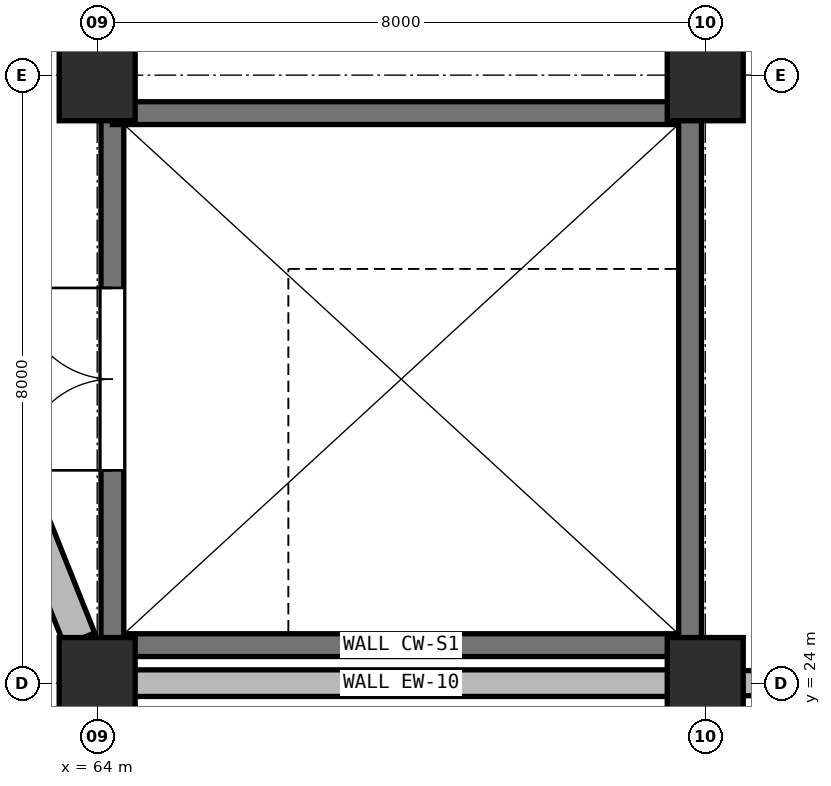
"""IFC4 building model, lengths in metres.
Left out: names, types, materials, properties, quantities, classifications, styles, units other than length and angle.
Written with IfcOpenShell. Run it as: python <this file> out.ifc"""

import sys

from ifc_helpers import new_model, si_unit, direction, frame, frame_2d, origin, origin_2d, place, context, subcontext, project, spatial, rectangle, extrude, element, fill, save


model = new_model("IFC4")
c1 = context("Model", 3, precision=1e-05, world=origin(), true_north=direction((0.0, 1.0)))
c2 = subcontext(c1, "Body", "Model", "MODEL_VIEW")
j1 = project(units=[si_unit("LENGTHUNIT", "METRE"), si_unit("PLANEANGLEUNIT", "RADIAN")], contexts=[c1])
p1 = place(None, origin())
s1 = spatial("IfcSite", under=j1, at=p1, CompositionType="ELEMENT")
p2 = place(p1, origin())
s2 = spatial("IfcBuilding", under=s1, at=p2, CompositionType="ELEMENT")
p3 = place(p2, frame((0.0, 0.0, 24.6)))
s3 = spatial("IfcBuildingStorey", under=s2, at=p3, CompositionType="ELEMENT", Elevation=24.6)
for number, where, z_axis, x_axis in (
    (1, (64.0, 24.0, 0.0), (0.0, 0.0, 1.0), (1.0, 0.0, 0.0)),
    (2, (64.0, 32.0, 0.0), (0.0, 0.0, 1.0), (1.0, 0.0, 0.0)),
    (3, (72.0, 24.0, 0.0), (0.0, 0.0, 1.0), (1.0, 0.0, 0.0)),
    (4, (72.0, 32.0, 0.0), (0.0, 0.0, 1.0), (1.0, 0.0, 0.0)),
):
    element("IfcColumn", number, at=place(p3, frame(where, z_axis=z_axis, x_axis=x_axis)), inside=s3, PredefinedType="COLUMN", context=c2, shape_type="SweptSolid", body=[
        extrude(rectangle(XDim=1.0, YDim=1.2, at=origin_2d()), origin(), (0.0, 0.0, 1.0), 4.8),
    ])
p4 = place(p3, frame((79.52, 24.0, 0.0), z_axis=(0.0, 0.0, 1.0), x_axis=(-1.0, 0.0, 0.0)))
e5 = element("IfcWall", 5, at=p4, inside=s3, PredefinedType="SOLIDWALL", context=c2, shape_type="SweptSolid", body=[
    extrude(rectangle(XDim=7.04, YDim=0.33, at=frame_2d((3.52, 0.0))), origin(), (0.0, 0.0, 1.0), 3.71),
])
p5 = place(p3, frame((71.52, 24.0, 0.0), z_axis=(0.0, 0.0, 1.0), x_axis=(-1.0, 0.0, 0.0)))
e6 = element("IfcWall", 6, at=p5, inside=s3, PredefinedType="SOLIDWALL", context=c2, shape_type="SweptSolid", body=[
    extrude(rectangle(XDim=7.04, YDim=0.35, at=frame_2d((3.52, 0.0))), origin(), (0.0, 0.0, 1.0), 3.71),
])
p6 = place(p3, frame((63.768, 24.58, 0.0), z_axis=(0.0, 0.0, 1.0), x_axis=(-0.371395943584, 0.928474583976, 0.0)))
e7 = element("IfcWall", 7, at=p6, inside=s3, PredefinedType="SOLIDWALL", context=c2, shape_type="SweptSolid", body=[
    extrude(rectangle(XDim=7.991, YDim=0.43, at=frame_2d((3.996, 0.0))), origin(), (0.0, 0.0, 1.0), 2.86),
])
p7 = place(p3, frame((71.8, 24.5, 0.0), z_axis=(0.0, 0.0, 1.0), x_axis=(-1.0, 0.0, 0.0)))
e8 = element("IfcWall", 8, at=p7, inside=s3, PredefinedType="SHEAR", context=c2, shape_type="SweptSolid", body=[
    extrude(rectangle(XDim=7.6, YDim=0.3, at=frame_2d((3.8, 0.0))), origin(), (0.0, 0.0, 1.0), 4.55),
])
p8 = place(p3, frame((64.2, 24.5, 0.0), z_axis=(0.0, 0.0, 1.0), x_axis=(0.0, 1.0, 0.0)))
e9 = element("IfcWall", 9, at=p8, inside=s3, PredefinedType="SHEAR", context=c2, shape_type="SweptSolid", body=[
    extrude(rectangle(XDim=7.0, YDim=0.3, at=frame_2d((3.5, 0.0))), origin(), (0.0, 0.0, 1.0), 4.55),
])
p9 = place(p8, frame((2.3, 0.0, 0.0)))
e10 = element("IfcOpeningElement", 10, at=p9, cuts=e9, PredefinedType="OPENING", context=c2, shape_type="SweptSolid", body=[
    extrude(rectangle(XDim=2.4, YDim=2.2, at=frame_2d((1.2, 1.1))), frame((0.0, 0.16, 0.0), z_axis=(0.0, -1.0, 0.0), x_axis=(1.0, 0.0, 0.0)), (0.0, 0.0, 1.0), 0.32),
])
p10 = place(p3, frame((64.2, 31.5, 0.0), z_axis=(0.0, 0.0, 1.0), x_axis=(1.0, 0.0, 0.0)))
e11 = element("IfcWall", 11, at=p10, inside=s3, PredefinedType="SHEAR", context=c2, shape_type="SweptSolid", body=[
    extrude(rectangle(XDim=7.6, YDim=0.3, at=frame_2d((3.8, 0.0))), origin(), (0.0, 0.0, 1.0), 4.55),
])
p11 = place(p3, frame((71.8, 31.5, 0.0), z_axis=(0.0, 0.0, 1.0), x_axis=(0.0, -1.0, 0.0)))
e12 = element("IfcWall", 12, at=p11, inside=s3, PredefinedType="SHEAR", context=c2, shape_type="SweptSolid", body=[
    extrude(rectangle(XDim=7.0, YDim=0.3, at=frame_2d((3.5, 0.0))), origin(), (0.0, 0.0, 1.0), 4.55),
])
p12 = place(p9, frame((2.4, 0.0, 0.0), z_axis=(0.0, 0.0, 1.0), x_axis=(-1.0, 0.0, 0.0)))
e13 = element("IfcDoor", 13, at=p12, inside=s3, OperationType="DOUBLE_DOOR_SINGLE_SWING", PredefinedType="DOOR", context=c2, shape_type="SweptSolid", body=[
    extrude(rectangle(XDim=2.4, YDim=2.2, at=frame_2d((1.2, 1.1))), frame((0.0, 0.025, 0.0), z_axis=(0.0, -1.0, 0.0), x_axis=(1.0, 0.0, 0.0)), (0.0, 0.0, 1.0), 0.05),
])
fill(e10, e13)
save(model, sys.argv[1])
